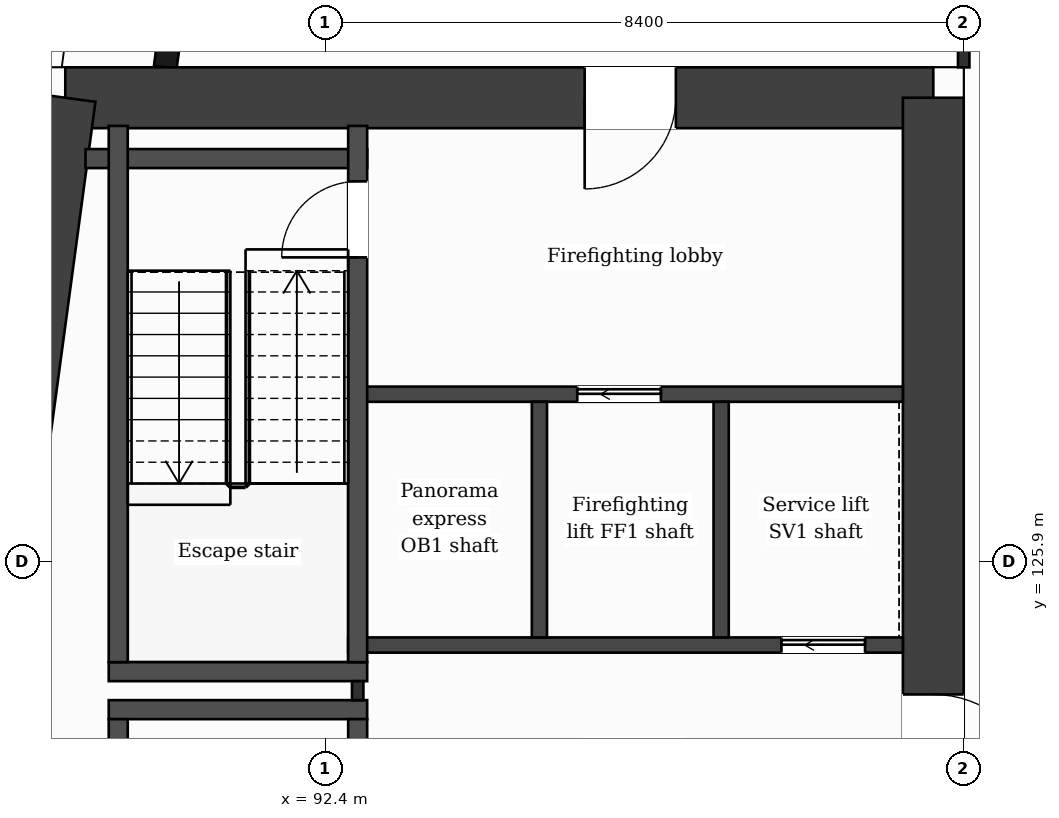
"""IFC4 building model, lengths in metres.
Left out: names, types, materials, properties, quantities, classifications, styles, units other than length and angle.
Written with IfcOpenShell. Run it as: python <this file> out.ifc"""

import sys

from ifc_helpers import new_model, si_unit, direction, frame, frame_2d, origin, place, context, subcontext, project, spatial, rectangle, extrude, element, fill, save


model = new_model("IFC4")
c1 = context("Model", 3, precision=1e-05, world=origin(), true_north=direction((0.0, 1.0)))
c2 = subcontext(c1, "Body", "Model", "MODEL_VIEW")
j1 = project(units=[si_unit("LENGTHUNIT", "METRE"), si_unit("PLANEANGLEUNIT", "RADIAN")], contexts=[c1])
p1 = place(None, origin())
s1 = spatial("IfcSite", under=j1, at=p1, CompositionType="ELEMENT")
p2 = place(p1, origin())
s2 = spatial("IfcBuilding", under=s1, at=p2, CompositionType="ELEMENT")
p3 = place(p2, frame((0.0, 0.0, 202.2)))
s3 = spatial("IfcBuildingStorey", under=s2, at=p3, CompositionType="ELEMENT", Elevation=202.2)
p4 = place(p3, frame((88.98, 132.0, 0.0), z_axis=(0.0, 0.0, 1.0), x_axis=(1.0, 0.0, 0.0)))
e1 = element("IfcWall", 1, at=p4, inside=s3, PredefinedType="SHEAR", context=c2, shape_type="SweptSolid", body=[
    extrude(rectangle(XDim=11.419, YDim=0.8, at=frame_2d((5.71, 0.0))), origin(), (0.0, 0.0, 1.0), 3.7),
])
p5 = place(p4, frame((6.833, 0.0, 0.0)))
e2 = element("IfcOpeningElement", 2, at=p5, cuts=e1, PredefinedType="OPENING", context=c2, shape_type="SweptSolid", body=[
    extrude(rectangle(XDim=1.2, YDim=2.1, at=frame_2d((0.6, 1.05))), frame((0.0, 0.41, 0.0), z_axis=(0.0, -1.0, 0.0), x_axis=(1.0, 0.0, 0.0)), (0.0, 0.0, 1.0), 0.82),
])
p6 = place(p3, frame((100.4, 132.0, 0.0), z_axis=(0.0, 0.0, 1.0), x_axis=(0.0, -1.0, 0.0)))
e3 = element("IfcWall", 3, at=p6, inside=s3, PredefinedType="SHEAR", context=c2, shape_type="SweptSolid", body=[
    extrude(rectangle(XDim=21.2, YDim=0.8, at=frame_2d((10.6, 0.0))), origin(), (0.0, 0.0, 1.0), 3.7),
])
p7 = place(p6, frame((7.85, 0.0, 0.0)))
e4 = element("IfcOpeningElement", 4, at=p7, cuts=e3, PredefinedType="OPENING", context=c2, shape_type="SweptSolid", body=[
    extrude(rectangle(XDim=1.4, YDim=2.1, at=frame_2d((0.7, 1.05))), frame((0.0, 0.41, 0.0), z_axis=(0.0, -1.0, 0.0), x_axis=(1.0, 0.0, 0.0)), (0.0, 0.0, 1.0), 0.82),
])
p8 = place(p3, frame((86.127, 110.8, 0.0), z_axis=(0.0, 0.0, 1.0), x_axis=(0.133408347329, 0.991061154956, 0.0)))
e5 = element("IfcWall", 5, at=p8, inside=s3, PredefinedType="SHEAR", context=c2, shape_type="SweptSolid", body=[
    extrude(rectangle(XDim=21.391, YDim=0.8, at=frame_2d((10.696, 0.0))), origin(), (0.0, 0.0, 1.0), 3.7),
])
p9 = place(p3, frame((91.177, 138.95, 0.0), z_axis=(0.0, 0.0, 1.0), x_axis=(-0.133426664613, -0.991058689065, 0.0)))
e6 = element("IfcWall", 6, at=p9, inside=s3, PredefinedType="SOLIDWALL", context=c2, shape_type="SweptSolid", body=[
    extrude(rectangle(XDim=6.609, YDim=0.3, at=frame_2d((3.305, 0.0))), origin(), (0.0, 0.0, 1.0), 3.38),
])
p10 = place(p9, frame((1.039, 0.0, 0.9)))
e7 = element("IfcOpeningElement", 7, at=p10, cuts=e6, PredefinedType="OPENING", context=c2, shape_type="SweptSolid", body=[
    extrude(rectangle(XDim=1.2, YDim=2.1, at=frame_2d((0.6, 1.05))), frame((0.0, 0.16, 0.0), z_axis=(0.0, -1.0, 0.0), x_axis=(1.0, 0.0, 0.0)), (0.0, 0.0, 1.0), 0.32),
])
p11 = place(p9, frame((4.294, 0.0, 0.0)))
e8 = element("IfcOpeningElement", 8, at=p11, cuts=e6, PredefinedType="OPENING", context=c2, shape_type="SweptSolid", body=[
    extrude(rectangle(XDim=1.2, YDim=2.4, at=frame_2d((0.6, 1.2))), frame((0.0, 0.16, 0.0), z_axis=(0.0, -1.0, 0.0), x_axis=(1.0, 0.0, 0.0)), (0.0, 0.0, 1.0), 0.32),
])
for number, where, z_axis, x_axis in (
    (9, (89.552, 123.95, 0.0), (0.0, 0.0, 1.0), (1.0, 0.0, 0.0)),
    (10, (89.552, 124.45, 0.0), (0.0, 0.0, 1.0), (1.0, 0.0, 0.0)),
):
    element("IfcWall", number, at=place(p3, frame(where, z_axis=z_axis, x_axis=x_axis)), inside=s3, PredefinedType="PARTITIONING", context=c2, shape_type="SweptSolid", body=[
        extrude(rectangle(XDim=3.4, YDim=0.25, at=frame_2d((1.7, 0.0))), origin(), (0.0, 0.0, 1.0), 3.38),
    ])
p12 = place(p3, frame((92.702, 124.8, 0.0), z_axis=(0.0, 0.0, 1.0), x_axis=(1.0, 0.0, 0.0)))
e11 = element("IfcWall", 11, at=p12, inside=s3, PredefinedType="PARTITIONING", context=c2, shape_type="SweptSolid", body=[
    extrude(rectangle(XDim=7.298, YDim=0.2, at=frame_2d((3.649, 0.0))), origin(), (0.0, 0.0, 1.0), 3.38),
])
p13 = place(p12, frame((5.7, 0.0, 0.0)))
e12 = element("IfcOpeningElement", 12, at=p13, cuts=e11, PredefinedType="OPENING", context=c2, shape_type="SweptSolid", body=[
    extrude(rectangle(XDim=1.1, YDim=2.1, at=frame_2d((0.55, 1.05))), frame((0.0, 0.11, 0.0), z_axis=(0.0, -1.0, 0.0), x_axis=(1.0, 0.0, 0.0)), (0.0, 0.0, 1.0), 0.22),
])
p14 = place(p3, frame((92.827, 128.1, 0.0), z_axis=(0.0, 0.0, 1.0), x_axis=(1.0, 0.0, 0.0)))
e13 = element("IfcWall", 13, at=p14, inside=s3, PredefinedType="PARTITIONING", context=c2, shape_type="SweptSolid", body=[
    extrude(rectangle(XDim=7.173, YDim=0.2, at=frame_2d((3.586, 0.0))), origin(), (0.0, 0.0, 1.0), 3.38),
])
p15 = place(p14, frame((2.889, 0.0, 0.0)))
e14 = element("IfcOpeningElement", 14, at=p15, cuts=e13, PredefinedType="OPENING", context=c2, shape_type="SweptSolid", body=[
    extrude(rectangle(XDim=1.1, YDim=2.1, at=frame_2d((0.55, 1.05))), frame((0.0, 0.11, 0.0), z_axis=(0.0, -1.0, 0.0), x_axis=(1.0, 0.0, 0.0)), (0.0, 0.0, 1.0), 0.22),
])
p16 = place(p3, frame((89.246, 131.2, 0.0), z_axis=(0.0, 0.0, 1.0), x_axis=(1.0, 0.0, 0.0)))
e15 = element("IfcWall", 15, at=p16, inside=s3, PredefinedType="PARTITIONING", context=c2, shape_type="SweptSolid", body=[
    extrude(rectangle(XDim=3.706, YDim=0.25, at=frame_2d((1.853, 0.0))), origin(), (0.0, 0.0, 1.0), 3.38),
])
for number, where, z_axis, x_axis in (
    (16, (89.677, 116.77, 0.0), (0.0, 0.0, 1.0), (0.0, 1.0, 0.0)),
    (17, (89.677, 124.575, 0.0), (0.0, 0.0, 1.0), (0.0, 1.0, 0.0)),
):
    element("IfcWall", number, at=place(p3, frame(where, z_axis=z_axis, x_axis=x_axis)), inside=s3, PredefinedType="PARTITIONING", context=c2, shape_type="SweptSolid", body=[
        extrude(rectangle(XDim=7.055, YDim=0.25, at=frame_2d((3.527, 0.0))), origin(), (0.0, 0.0, 1.0), 3.38),
    ])
p17 = place(p3, frame((92.827, 124.075, 0.0), z_axis=(0.0, 0.0, 1.0), x_axis=(0.0, 1.0, 0.0)))
e18 = element("IfcWall", 18, at=p17, inside=s3, PredefinedType="PARTITIONING", context=c2, shape_type="SweptSolid", body=[
    extrude(rectangle(XDim=0.25, YDim=0.15, at=frame_2d((0.125, 0.0))), origin(), (0.0, 0.0, 1.0), 3.38),
])
p18 = place(p3, frame((92.827, 116.77, 0.0), z_axis=(0.0, 0.0, 1.0), x_axis=(0.0, 1.0, 0.0)))
e19 = element("IfcWall", 19, at=p18, inside=s3, PredefinedType="PARTITIONING", context=c2, shape_type="SweptSolid", body=[
    extrude(rectangle(XDim=7.055, YDim=0.25, at=frame_2d((3.527, 0.0))), origin(), (0.0, 0.0, 1.0), 3.38),
])
p19 = place(p18, frame((5.755, 0.0, 0.0)))
e20 = element("IfcOpeningElement", 20, at=p19, cuts=e19, PredefinedType="OPENING", context=c2, shape_type="SweptSolid", body=[
    extrude(rectangle(XDim=0.95, YDim=2.1, at=frame_2d((0.475, 1.05))), frame((0.0, 0.135, 0.0), z_axis=(0.0, -1.0, 0.0), x_axis=(1.0, 0.0, 0.0)), (0.0, 0.0, 1.0), 0.27),
])
p20 = place(p3, frame((92.827, 124.575, 0.0), z_axis=(0.0, 0.0, 1.0), x_axis=(0.0, 1.0, 0.0)))
e21 = element("IfcWall", 21, at=p20, inside=s3, PredefinedType="PARTITIONING", context=c2, shape_type="SweptSolid", body=[
    extrude(rectangle(XDim=7.055, YDim=0.25, at=frame_2d((3.527, 0.0))), origin(), (0.0, 0.0, 1.0), 3.38),
])
p21 = place(p20, frame((5.325, 0.0, 0.0)))
e22 = element("IfcOpeningElement", 22, at=p21, cuts=e21, PredefinedType="OPENING", context=c2, shape_type="SweptSolid", body=[
    extrude(rectangle(XDim=1.0, YDim=2.1, at=frame_2d((0.5, 1.05))), frame((0.0, 0.135, 0.0), z_axis=(0.0, -1.0, 0.0), x_axis=(1.0, 0.0, 0.0)), (0.0, 0.0, 1.0), 0.27),
])
for number, where, z_axis, x_axis in (
    (23, (95.218, 124.9, 0.0), (0.0, 0.0, 1.0), (0.0, 1.0, 0.0)),
    (24, (97.609, 124.9, 0.0), (0.0, 0.0, 1.0), (0.0, 1.0, 0.0)),
):
    element("IfcWall", number, at=place(p3, frame(where, z_axis=z_axis, x_axis=x_axis)), inside=s3, PredefinedType="PARTITIONING", context=c2, shape_type="SweptSolid", body=[
        extrude(rectangle(XDim=3.1, YDim=0.2, at=frame_2d((1.55, 0.0))), origin(), (0.0, 0.0, 1.0), 3.38),
    ])
p22 = place(p3, frame((100.8, 132.4, 0.0), z_axis=(0.0, 0.0, 1.0), x_axis=(0.0, 1.0, 0.0)))
e25 = element("IfcWall", 25, at=p22, inside=s3, PredefinedType="PARTITIONING", context=c2, shape_type="SweptSolid", body=[
    extrude(rectangle(XDim=1.325, YDim=0.15, at=frame_2d((0.663, 0.0))), origin(), (0.0, 0.0, 1.0), 3.38),
])
p23 = place(p15, origin())
e26 = element("IfcDoor", 26, at=p23, inside=s3, OperationType="SLIDING_TO_LEFT", PredefinedType="DOOR", context=c2, shape_type="SweptSolid", body=[
    extrude(rectangle(XDim=1.1, YDim=2.1, at=frame_2d((0.55, 1.05))), frame((0.0, 0.025, 0.0), z_axis=(0.0, -1.0, 0.0), x_axis=(1.0, 0.0, 0.0)), (0.0, 0.0, 1.0), 0.05),
])
fill(e14, e26)
p24 = place(p13, origin())
e27 = element("IfcDoor", 27, at=p24, inside=s3, OperationType="SLIDING_TO_LEFT", PredefinedType="DOOR", context=c2, shape_type="SweptSolid", body=[
    extrude(rectangle(XDim=1.1, YDim=2.1, at=frame_2d((0.55, 1.05))), frame((0.0, 0.025, 0.0), z_axis=(0.0, -1.0, 0.0), x_axis=(1.0, 0.0, 0.0)), (0.0, 0.0, 1.0), 0.05),
])
fill(e12, e27)
p25 = place(p21, origin())
e28 = element("IfcDoor", 28, at=p25, inside=s3, OperationType="SINGLE_SWING_LEFT", PredefinedType="DOOR", context=c2, shape_type="SweptSolid", body=[
    extrude(rectangle(XDim=1.0, YDim=2.1, at=frame_2d((0.5, 1.05))), frame((0.0, 0.025, 0.0), z_axis=(0.0, -1.0, 0.0), x_axis=(1.0, 0.0, 0.0)), (0.0, 0.0, 1.0), 0.05),
])
fill(e22, e28)
p26 = place(p5, origin())
e29 = element("IfcDoor", 29, at=p26, inside=s3, OperationType="SINGLE_SWING_LEFT", PredefinedType="DOOR", context=c2, shape_type="SweptSolid", body=[
    extrude(rectangle(XDim=1.2, YDim=2.1, at=frame_2d((0.6, 1.05))), frame((0.0, 0.025, 0.0), z_axis=(0.0, -1.0, 0.0), x_axis=(1.0, 0.0, 0.0)), (0.0, 0.0, 1.0), 0.05),
])
fill(e2, e29)
p27 = place(p7, origin())
e30 = element("IfcDoor", 30, at=p27, inside=s3, OperationType="SINGLE_SWING_RIGHT", PredefinedType="DOOR", context=c2, shape_type="SweptSolid", body=[
    extrude(rectangle(XDim=1.4, YDim=2.1, at=frame_2d((0.7, 1.05))), frame((0.0, 0.025, 0.0), z_axis=(0.0, -1.0, 0.0), x_axis=(1.0, 0.0, 0.0)), (0.0, 0.0, 1.0), 0.05),
])
fill(e4, e30)
save(model, sys.argv[1])
